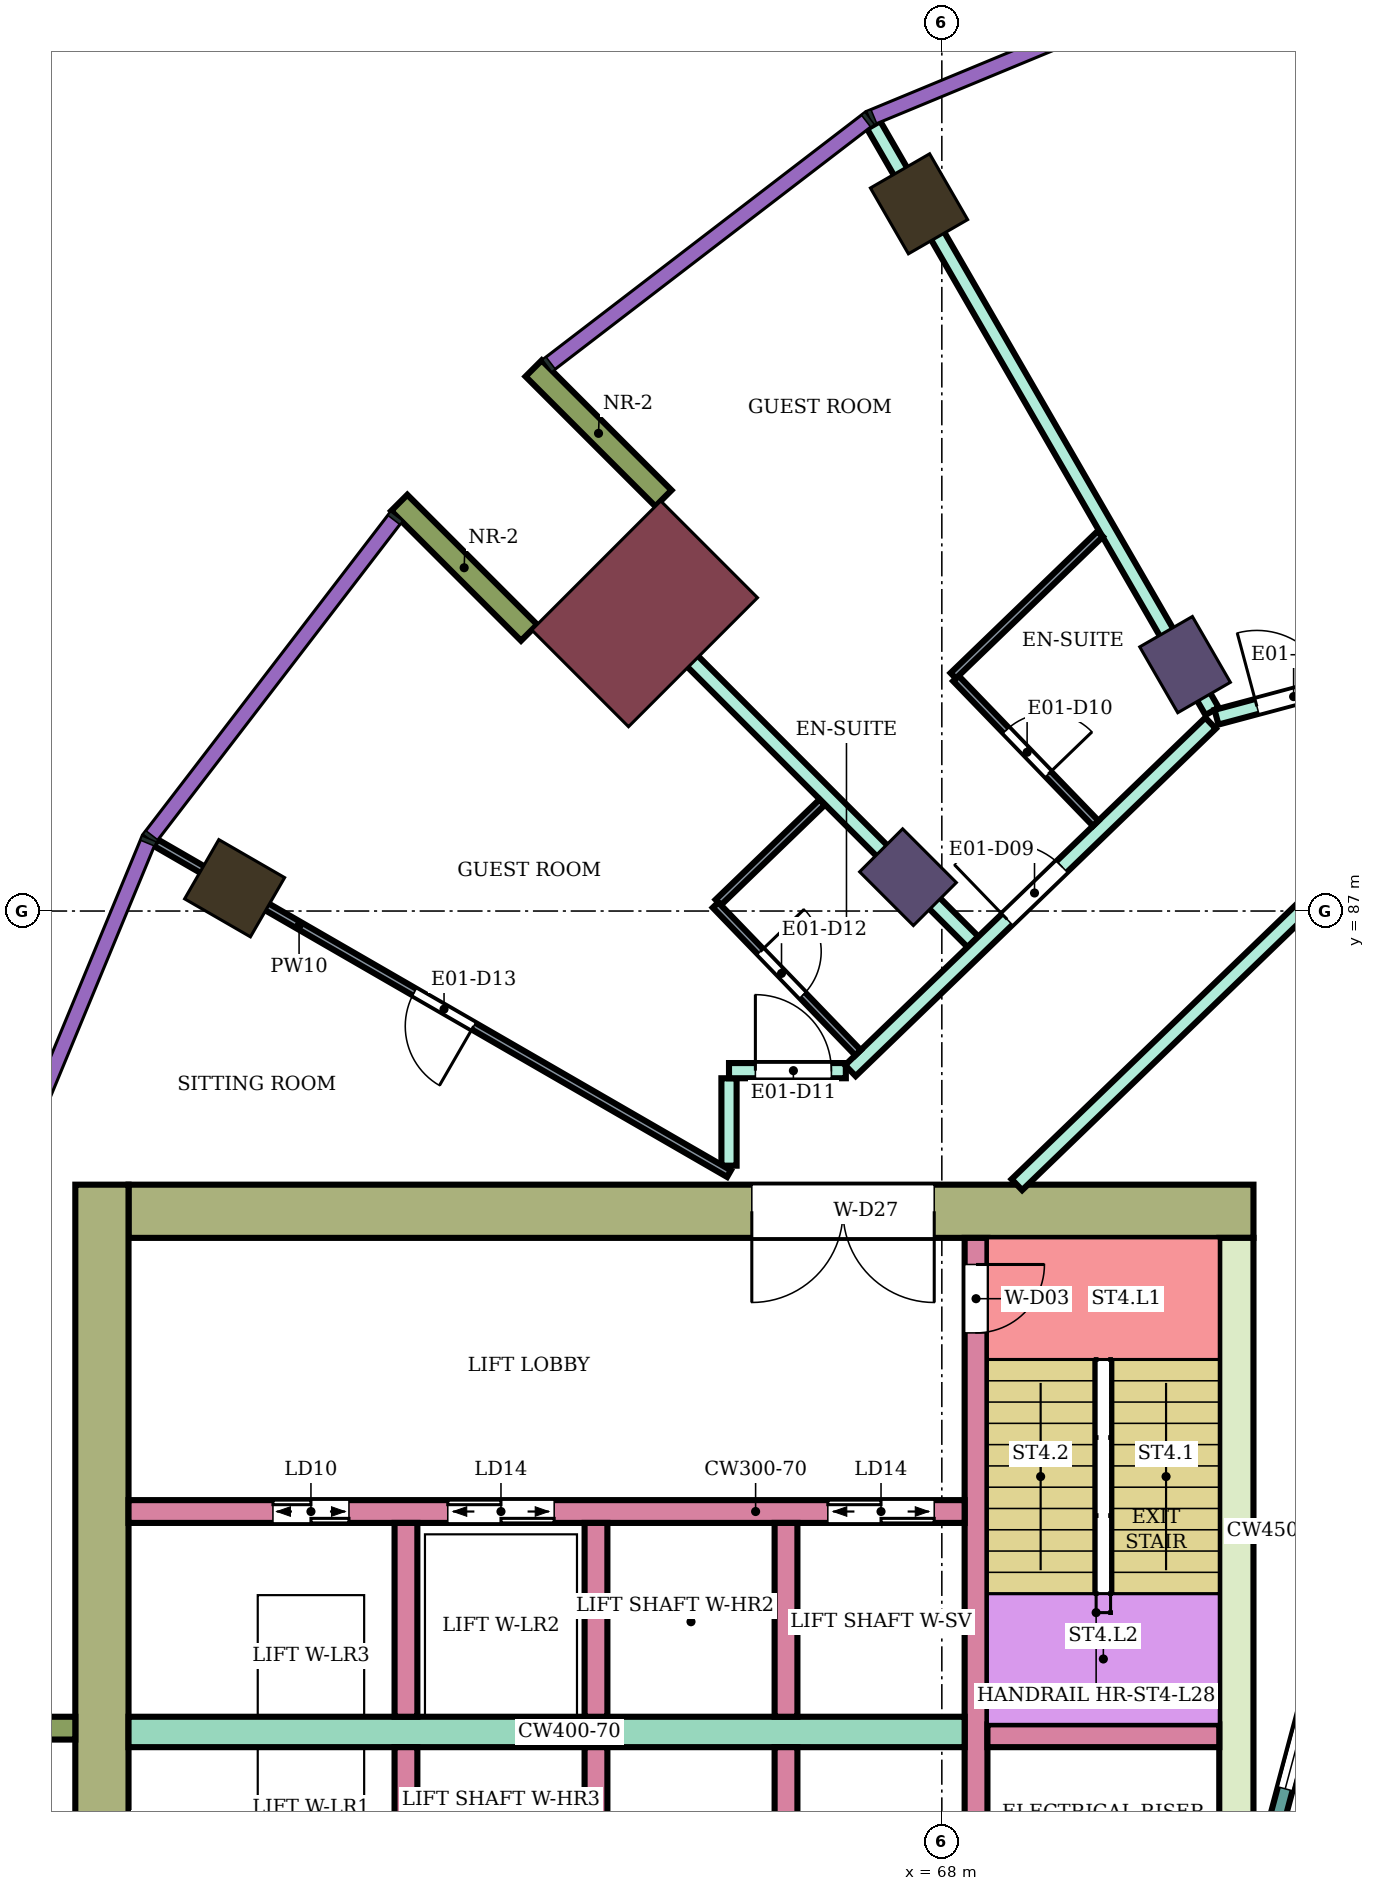
"""IFC4 building model, lengths in metres.
Left out: names, types, materials, properties, quantities, classifications, styles, units other than length and angle.
Written with IfcOpenShell. Run it as: python <this file> out.ifc"""

import sys

from ifc_helpers import new_model, si_unit, direction, frame, frame_2d, origin, origin_2d, place, context, subcontext, project, spatial, rectangle, extrude, element, fill, save


model = new_model("IFC4")
c1 = context("Model", 3, precision=1e-05, world=origin(), true_north=direction((0.0, 1.0)))
c2 = subcontext(c1, "Body", "Model", "MODEL_VIEW")
j1 = project(units=[si_unit("LENGTHUNIT", "METRE"), si_unit("PLANEANGLEUNIT", "RADIAN")], contexts=[c1])
p1 = place(None, origin())
s1 = spatial("IfcSite", under=j1, at=p1, CompositionType="ELEMENT")
p2 = place(p1, origin())
s2 = spatial("IfcBuilding", under=s1, at=p2, CompositionType="ELEMENT")
p3 = place(p2, frame((0.0, 0.0, 122.4)))
s3 = spatial("IfcBuildingStorey", under=s2, at=p3, CompositionType="ELEMENT", Elevation=122.4)
for number, where, z_axis, x_axis in (
    (1, (67.7, 96.304, 0.0), (0.0, 0.0, 1.0), (-0.5, 0.866, 0.0)),
    (2, (58.696, 87.3, 0.0), (0.0, 0.0, 1.0), (-0.866, 0.5, 0.0)),
):
    element("IfcColumn", number, at=place(p3, frame(where, z_axis=z_axis, x_axis=x_axis)), inside=s3, PredefinedType="COLUMN", context=c2, shape_type="SweptSolid", body=[
        extrude(rectangle(XDim=1.0, YDim=0.9, at=origin_2d()), origin(), (0.0, 0.0, 1.0), 3.9),
    ])
for number, where, z_axis, x_axis in (
    (3, (71.2, 90.242, 0.0), (0.0, 0.0, 1.0), (-0.5, 0.866, 0.0)),
    (4, (67.555, 87.445, 0.0), (0.0, 0.0, 1.0), (-0.707, 0.707, 0.0)),
):
    element("IfcColumn", number, at=place(p3, frame(where, z_axis=z_axis, x_axis=x_axis)), inside=s3, PredefinedType="COLUMN", context=c2, shape_type="SweptSolid", body=[
        extrude(rectangle(XDim=1.0, YDim=0.8, at=origin_2d()), origin(), (0.0, 0.0, 1.0), 3.9),
    ])
p4 = place(p3, frame((64.09, 90.91, 0.0), z_axis=(0.0, 0.0, 1.0), x_axis=(-0.707106781187, 0.707106781187, 0.0)))
e5 = element("IfcColumn", 5, at=p4, inside=s3, PredefinedType="COLUMN", context=c2, shape_type="SweptSolid", body=[
    extrude(rectangle(XDim=1.8, YDim=2.4, at=origin_2d()), origin(), (0.0, 0.0, 1.0), 3.9),
])
p5 = place(p3, frame((72.1, 83.05, 0.0), z_axis=(0.0, 0.0, 1.0), x_axis=(-1.0, 0.0, 0.0)))
e6 = element("IfcWall", 6, at=p5, inside=s3, PredefinedType="SHEAR", context=c2, shape_type="SweptSolid", body=[
    extrude(rectangle(XDim=14.8, YDim=0.7, at=frame_2d((7.4, 0.0))), origin(), (0.0, 0.0, 1.0), 3.58),
])
p6 = place(p5, frame((4.2, 0.0, 0.0)))
e7 = element("IfcOpeningElement", 7, at=p6, cuts=e6, PredefinedType="OPENING", context=c2, shape_type="SweptSolid", body=[
    extrude(rectangle(XDim=2.4, YDim=2.4, at=frame_2d((1.2, 1.2))), frame((0.0, 0.36, 0.0), z_axis=(0.0, -1.0, 0.0), x_axis=(1.0, 0.0, 0.0)), (0.0, 0.0, 1.0), 0.72),
])
p7 = place(p3, frame((71.875, 82.7, 0.0), z_axis=(0.0, 0.0, 1.0), x_axis=(0.0, -1.0, 0.0)))
e8 = element("IfcWall", 8, at=p7, inside=s3, PredefinedType="SHEAR", context=c2, shape_type="SweptSolid", body=[
    extrude(rectangle(XDim=7.7, YDim=0.45, at=frame_2d((3.85, 0.0))), origin(), (0.0, 0.0, 1.0), 3.58),
])
p8 = place(p3, frame((56.95, 83.4, 0.0), z_axis=(0.0, 0.0, 1.0), x_axis=(0.0, -1.0, 0.0)))
e9 = element("IfcWall", 9, at=p8, inside=s3, PredefinedType="SHEAR", context=c2, shape_type="SweptSolid", body=[
    extrude(rectangle(XDim=16.8, YDim=0.7, at=frame_2d((8.4, 0.0))), origin(), (0.0, 0.0, 1.0), 3.58),
])
p9 = place(p3, frame((68.45, 82.7, 0.0), z_axis=(0.0, 0.0, 1.0), x_axis=(0.0, -1.0, 0.0)))
e10 = element("IfcWall", 10, at=p9, inside=s3, PredefinedType="SHEAR", context=c2, shape_type="SweptSolid", body=[
    extrude(rectangle(XDim=7.7, YDim=0.3, at=frame_2d((3.85, 0.0))), origin(), (0.0, 0.0, 1.0), 3.58),
])
p10 = place(p9, frame((0.35, 0.0, 0.0)))
e11 = element("IfcOpeningElement", 11, at=p10, cuts=e10, PredefinedType="OPENING", context=c2, shape_type="SweptSolid", body=[
    extrude(rectangle(XDim=0.9, YDim=2.1, at=frame_2d((0.45, 1.05))), frame((0.0, 0.16, 0.0), z_axis=(0.0, -1.0, 0.0), x_axis=(1.0, 0.0, 0.0)), (0.0, 0.0, 1.0), 0.32),
])
p11 = place(p3, frame((71.65, 76.15, 0.0), z_axis=(0.0, 0.0, 1.0), x_axis=(-1.0, 0.0, 0.0)))
e12 = element("IfcWall", 12, at=p11, inside=s3, PredefinedType="SHEAR", context=c2, shape_type="SweptSolid", body=[
    extrude(rectangle(XDim=3.05, YDim=0.3, at=frame_2d((1.525, 0.0))), origin(), (0.0, 0.0, 1.0), 3.58),
])
p12 = place(p3, frame((68.3, 76.2, 0.0), z_axis=(0.0, 0.0, 1.0), x_axis=(-1.0, 0.0, 0.0)))
e13 = element("IfcWall", 13, at=p12, inside=s3, PredefinedType="SHEAR", context=c2, shape_type="SweptSolid", body=[
    extrude(rectangle(XDim=11.0, YDim=0.4, at=frame_2d((5.5, 0.0))), origin(), (0.0, 0.0, 1.0), 3.58),
])
p13 = place(p3, frame((68.3, 79.1, 0.0), z_axis=(0.0, 0.0, 1.0), x_axis=(-1.0, 0.0, 0.0)))
e14 = element("IfcWall", 14, at=p13, inside=s3, PredefinedType="SHEAR", context=c2, shape_type="SweptSolid", body=[
    extrude(rectangle(XDim=11.0, YDim=0.3, at=frame_2d((5.5, 0.0))), origin(), (0.0, 0.0, 1.0), 3.58),
])
p14 = place(p13, frame((0.4, 0.0, 0.0)))
e15 = element("IfcOpeningElement", 15, at=p14, cuts=e14, PredefinedType="OPENING", context=c2, shape_type="SweptSolid", body=[
    extrude(rectangle(XDim=1.4, YDim=2.1, at=frame_2d((0.7, 1.05))), frame((0.0, 0.16, 0.0), z_axis=(0.0, -1.0, 0.0), x_axis=(1.0, 0.0, 0.0)), (0.0, 0.0, 1.0), 0.32),
])
p15 = place(p13, frame((5.4, 0.0, 0.0)))
e16 = element("IfcOpeningElement", 16, at=p15, cuts=e14, PredefinedType="OPENING", context=c2, shape_type="SweptSolid", body=[
    extrude(rectangle(XDim=1.4, YDim=2.1, at=frame_2d((0.7, 1.05))), frame((0.0, 0.16, 0.0), z_axis=(0.0, -1.0, 0.0), x_axis=(1.0, 0.0, 0.0)), (0.0, 0.0, 1.0), 0.32),
])
p16 = place(p13, frame((8.1, 0.0, 0.0)))
e17 = element("IfcOpeningElement", 17, at=p16, cuts=e14, PredefinedType="OPENING", context=c2, shape_type="SweptSolid", body=[
    extrude(rectangle(XDim=1.0, YDim=2.1, at=frame_2d((0.5, 1.05))), frame((0.0, 0.16, 0.0), z_axis=(0.0, -1.0, 0.0), x_axis=(1.0, 0.0, 0.0)), (0.0, 0.0, 1.0), 0.32),
])
for number, where, z_axis, x_axis in (
    (18, (65.95, 76.0, 0.0), (0.0, 0.0, 1.0), (0.0, -1.0, 0.0)),
    (19, (63.45, 76.0, 0.0), (0.0, 0.0, 1.0), (0.0, -1.0, 0.0)),
    (20, (60.95, 76.0, 0.0), (0.0, 0.0, 1.0), (0.0, -1.0, 0.0)),
    (21, (65.95, 78.95, 0.0), (0.0, 0.0, 1.0), (0.0, -1.0, 0.0)),
    (22, (63.45, 78.95, 0.0), (0.0, 0.0, 1.0), (0.0, -1.0, 0.0)),
    (23, (60.95, 78.95, 0.0), (0.0, 0.0, 1.0), (0.0, -1.0, 0.0)),
):
    element("IfcWall", number, at=place(p3, frame(where, z_axis=z_axis, x_axis=x_axis)), inside=s3, PredefinedType="SHEAR", context=c2, shape_type="SweptSolid", body=[
        extrude(rectangle(XDim=2.55, YDim=0.3, at=frame_2d((1.275, 0.0))), origin(), (0.0, 0.0, 1.0), 3.58),
    ])
for number, where, z_axis, x_axis in (
    (24, (64.338, 92.43, 0.0), (0.0, 0.0, 1.0), (-0.707, 0.707, 0.0)),
    (25, (62.57, 90.662, 0.0), (0.0, 0.0, 1.0), (-0.707, 0.707, 0.0)),
    (26, (56.6, 76.25, 0.0), (0.0, 0.0, 1.0), (-1.0, 0.0, 0.0)),
):
    element("IfcWall", number, at=place(p3, frame(where, z_axis=z_axis, x_axis=x_axis)), inside=s3, PredefinedType="NOTDEFINED", context=c2, shape_type="SweptSolid", body=[
        extrude(rectangle(XDim=2.416, YDim=0.3, at=frame_2d((1.208, 0.0))), origin(), (0.0, 0.0, 1.0), 3.9),
    ])
p17 = place(p3, frame((73.415, 78.802, 0.0), z_axis=(0.0, 0.0, 1.0), x_axis=(-0.258789828301, -0.965933654434, 0.0)))
e27 = element("IfcWall", 27, at=p17, inside=s3, PredefinedType="NOTDEFINED", context=c2, shape_type="SweptSolid", body=[
    extrude(rectangle(XDim=3.936, YDim=0.2, at=frame_2d((1.968, 0.0))), origin(), (0.0, 0.0, 1.0), 3.9),
])
p18 = place(p17, frame((0.468, 0.0, 0.9)))
e28 = element("IfcOpeningElement", 28, at=p18, cuts=e27, PredefinedType="OPENING", context=c2, shape_type="SweptSolid", body=[
    extrude(rectangle(XDim=3.0, YDim=2.3, at=frame_2d((1.5, 1.15))), frame((0.0, 0.11, 0.0), z_axis=(0.0, -1.0, 0.0), x_axis=(1.0, 0.0, 0.0)), (0.0, 0.0, 1.0), 0.22),
])
p19 = place(p3, frame((63.598, 91.408, 0.0), z_axis=(0.0, 0.0, 1.0), x_axis=(0.706963264491, -0.707250268759, 0.0)))
e29 = element("IfcWall", 29, at=p19, inside=s3, PredefinedType="PARTITIONING", context=c2, shape_type="SweptSolid", body=[
    extrude(rectangle(XDim=6.805, YDim=0.2, at=frame_2d((3.403, 0.0))), origin(), (0.0, 0.0, 1.0), 3.45),
])
p20 = place(p3, frame((65.2, 83.65, 0.0), z_axis=(0.0, 0.0, 1.0), x_axis=(0.0, 1.0, 0.0)))
e30 = element("IfcWall", 30, at=p20, inside=s3, PredefinedType="PARTITIONING", context=c2, shape_type="SweptSolid", body=[
    extrude(rectangle(XDim=1.15, YDim=0.2, at=frame_2d((0.575, 0.0))), origin(), (0.0, 0.0, 1.0), 3.45),
])
p21 = place(p3, frame((65.2, 84.9, 0.0), z_axis=(0.0, 0.0, 1.0), x_axis=(1.0, 0.0, 0.0)))
e31 = element("IfcWall", 31, at=p21, inside=s3, PredefinedType="PARTITIONING", context=c2, shape_type="SweptSolid", body=[
    extrude(rectangle(XDim=1.537, YDim=0.2, at=frame_2d((0.769, 0.0))), origin(), (0.0, 0.0, 1.0), 3.45),
])
p22 = place(p21, frame((0.347, 0.0, 0.0)))
e32 = element("IfcOpeningElement", 32, at=p22, cuts=e31, PredefinedType="OPENING", context=c2, shape_type="SweptSolid", body=[
    extrude(rectangle(XDim=1.0, YDim=2.1, at=frame_2d((0.5, 1.05))), frame((0.0, 0.11, 0.0), z_axis=(0.0, -1.0, 0.0), x_axis=(1.0, 0.0, 0.0)), (0.0, 0.0, 1.0), 0.22),
])
p23 = place(p3, frame((66.797, 84.9, 0.0), z_axis=(0.0, 0.0, 1.0), x_axis=(0.719692092412, 0.694293376116, 0.0)))
e33 = element("IfcWall", 33, at=p23, inside=s3, PredefinedType="PARTITIONING", context=c2, shape_type="SweptSolid", body=[
    extrude(rectangle(XDim=6.584, YDim=0.2, at=frame_2d((3.292, 0.0))), origin(), (0.0, 0.0, 1.0), 3.45),
])
p24 = place(p23, frame((2.866, 0.0, 0.0)))
e34 = element("IfcOpeningElement", 34, at=p24, cuts=e33, PredefinedType="OPENING", context=c2, shape_type="SweptSolid", body=[
    extrude(rectangle(XDim=1.0, YDim=2.1, at=frame_2d((0.5, 1.05))), frame((0.0, 0.11, 0.0), z_axis=(0.0, -1.0, 0.0), x_axis=(1.0, 0.0, 0.0)), (0.0, 0.0, 1.0), 0.22),
])
p25 = place(p3, frame((67.102, 97.342, 0.0), z_axis=(0.0, 0.0, 1.0), x_axis=(0.499927298089, -0.866067374183, 0.0)))
e35 = element("IfcWall", 35, at=p25, inside=s3, PredefinedType="PARTITIONING", context=c2, shape_type="SweptSolid", body=[
    extrude(rectangle(XDim=8.907, YDim=0.2, at=frame_2d((4.454, 0.0))), origin(), (0.0, 0.0, 1.0), 3.45),
])
p26 = place(p3, frame((68.987, 83.4, 0.0), z_axis=(0.0, 0.0, 1.0), x_axis=(0.719586298962, 0.694403022997, 0.0)))
e36 = element("IfcWall", 36, at=p26, inside=s3, PredefinedType="PARTITIONING", context=c2, shape_type="SweptSolid", body=[
    extrude(rectangle(XDim=5.439, YDim=0.2, at=frame_2d((2.719, 0.0))), origin(), (0.0, 0.0, 1.0), 3.45),
])
p27 = place(p3, frame((71.614, 89.55, 0.0), z_axis=(0.0, 0.0, 1.0), x_axis=(0.965967958589, 0.258661753994, 0.0)))
e37 = element("IfcWall", 37, at=p27, inside=s3, PredefinedType="PARTITIONING", context=c2, shape_type="SweptSolid", body=[
    extrude(rectangle(XDim=8.592, YDim=0.2, at=frame_2d((4.296, 0.0))), origin(), (0.0, 0.0, 1.0), 3.45),
])
p28 = place(p27, frame((0.55, 0.0, 0.0)))
e38 = element("IfcOpeningElement", 38, at=p28, cuts=e37, PredefinedType="OPENING", context=c2, shape_type="SweptSolid", body=[
    extrude(rectangle(XDim=1.0, YDim=2.1, at=frame_2d((0.5, 1.05))), frame((0.0, 0.11, 0.0), z_axis=(0.0, -1.0, 0.0), x_axis=(1.0, 0.0, 0.0)), (0.0, 0.0, 1.0), 0.22),
])
p29 = place(p3, frame((57.659, 87.899, 0.0), z_axis=(0.0, 0.0, 1.0), x_axis=(0.86602264145, -0.500004784474, 0.0)))
e39 = element("IfcWall", 39, at=p29, inside=s3, PredefinedType="PARTITIONING", context=c2, shape_type="SweptSolid", body=[
    extrude(rectangle(XDim=8.708, YDim=0.1, at=frame_2d((4.354, 0.0))), origin(), (0.0, 0.0, 1.0), 3.45),
])
p30 = place(p29, frame((3.929, 0.0, 0.0)))
e40 = element("IfcOpeningElement", 40, at=p30, cuts=e39, PredefinedType="OPENING", context=c2, shape_type="SweptSolid", body=[
    extrude(rectangle(XDim=0.9, YDim=2.1, at=frame_2d((0.45, 1.05))), frame((0.0, 0.06, 0.0), z_axis=(0.0, -1.0, 0.0), x_axis=(1.0, 0.0, 0.0)), (0.0, 0.0, 1.0), 0.12),
])
p31 = place(p3, frame((65.059, 87.114, 0.0), z_axis=(0.0, 0.0, 1.0), x_axis=(0.719715847356, 0.694268751324, 0.0)))
e41 = element("IfcWall", 41, at=p31, inside=s3, PredefinedType="PARTITIONING", context=c2, shape_type="SweptSolid", body=[
    extrude(rectangle(XDim=1.9, YDim=0.1, at=frame_2d((0.95, 0.0))), origin(), (0.0, 0.0, 1.0), 3.45),
])
p32 = place(p3, frame((65.023, 87.079, 0.0), z_axis=(0.0, 0.0, 1.0), x_axis=(0.694287838235, -0.719697434815, 0.0)))
e42 = element("IfcWall", 42, at=p32, inside=s3, PredefinedType="PARTITIONING", context=c2, shape_type="SweptSolid", body=[
    extrude(rectangle(XDim=2.7, YDim=0.1, at=frame_2d((1.35, 0.0))), origin(), (0.0, 0.0, 1.0), 3.45),
])
p33 = place(p32, frame((0.85, 0.0, 0.0)))
e43 = element("IfcOpeningElement", 43, at=p33, cuts=e42, PredefinedType="OPENING", context=c2, shape_type="SweptSolid", body=[
    extrude(rectangle(XDim=0.8, YDim=2.1, at=frame_2d((0.4, 1.05))), frame((0.0, 0.06, 0.0), z_axis=(0.0, -1.0, 0.0), x_axis=(1.0, 0.0, 0.0)), (0.0, 0.0, 1.0), 0.12),
])
p34 = place(p3, frame((68.185, 90.06, 0.0), z_axis=(0.0, 0.0, 1.0), x_axis=(0.69446127412, -0.719530081892, 0.0)))
e44 = element("IfcWall", 44, at=p34, inside=s3, PredefinedType="PARTITIONING", context=c2, shape_type="SweptSolid", body=[
    extrude(rectangle(XDim=2.649, YDim=0.1, at=frame_2d((1.324, 0.0))), origin(), (0.0, 0.0, 1.0), 3.45),
])
p35 = place(p34, frame((0.95, 0.0, 0.0)))
e45 = element("IfcOpeningElement", 45, at=p35, cuts=e44, PredefinedType="OPENING", context=c2, shape_type="SweptSolid", body=[
    extrude(rectangle(XDim=0.8, YDim=2.1, at=frame_2d((0.4, 1.05))), frame((0.0, 0.06, 0.0), z_axis=(0.0, -1.0, 0.0), x_axis=(1.0, 0.0, 0.0)), (0.0, 0.0, 1.0), 0.12),
])
p36 = place(p3, frame((68.15, 90.096, 0.0), z_axis=(0.0, 0.0, 1.0), x_axis=(0.719667544954, 0.694318820672, 0.0)))
e46 = element("IfcWall", 46, at=p36, inside=s3, PredefinedType="PARTITIONING", context=c2, shape_type="SweptSolid", body=[
    extrude(rectangle(XDim=2.687, YDim=0.1, at=frame_2d((1.344, 0.0))), origin(), (0.0, 0.0, 1.0), 3.45),
])
p37 = place(p18, origin())
e47 = element("IfcWindow", 47, at=p37, inside=s3, PartitioningType="SINGLE_PANEL", PredefinedType="WINDOW", context=c2, shape_type="SweptSolid", body=[
    extrude(rectangle(XDim=3.0, YDim=2.3, at=frame_2d((1.5, 1.15))), frame((0.0, 0.03, 0.0), z_axis=(0.0, -1.0, 0.0), x_axis=(1.0, 0.0, 0.0)), (0.0, 0.0, 1.0), 0.06),
])
fill(e28, e47)
p38 = place(p28, origin())
e48 = element("IfcDoor", 48, at=p38, inside=s3, OperationType="SINGLE_SWING_LEFT", PredefinedType="DOOR", context=c2, shape_type="SweptSolid", body=[
    extrude(rectangle(XDim=1.0, YDim=2.1, at=frame_2d((0.5, 1.05))), frame((0.0, 0.025, 0.0), z_axis=(0.0, -1.0, 0.0), x_axis=(1.0, 0.0, 0.0)), (0.0, 0.0, 1.0), 0.05),
])
fill(e38, e48)
p39 = place(p24, origin())
e49 = element("IfcDoor", 49, at=p39, inside=s3, OperationType="SINGLE_SWING_LEFT", PredefinedType="DOOR", context=c2, shape_type="SweptSolid", body=[
    extrude(rectangle(XDim=1.0, YDim=2.1, at=frame_2d((0.5, 1.05))), frame((0.0, 0.025, 0.0), z_axis=(0.0, -1.0, 0.0), x_axis=(1.0, 0.0, 0.0)), (0.0, 0.0, 1.0), 0.05),
])
fill(e34, e49)
p40 = place(p35, origin())
e50 = element("IfcDoor", 50, at=p40, inside=s3, OperationType="SINGLE_SWING_RIGHT", PredefinedType="DOOR", context=c2, shape_type="SweptSolid", body=[
    extrude(rectangle(XDim=0.8, YDim=2.1, at=frame_2d((0.4, 1.05))), frame((0.0, 0.025, 0.0), z_axis=(0.0, -1.0, 0.0), x_axis=(1.0, 0.0, 0.0)), (0.0, 0.0, 1.0), 0.05),
])
fill(e45, e50)
p41 = place(p22, origin())
e51 = element("IfcDoor", 51, at=p41, inside=s3, OperationType="SINGLE_SWING_LEFT", PredefinedType="DOOR", context=c2, shape_type="SweptSolid", body=[
    extrude(rectangle(XDim=1.0, YDim=2.1, at=frame_2d((0.5, 1.05))), frame((0.0, 0.025, 0.0), z_axis=(0.0, -1.0, 0.0), x_axis=(1.0, 0.0, 0.0)), (0.0, 0.0, 1.0), 0.05),
])
fill(e32, e51)
p42 = place(p33, origin())
e52 = element("IfcDoor", 52, at=p42, inside=s3, OperationType="SINGLE_SWING_LEFT", PredefinedType="DOOR", context=c2, shape_type="SweptSolid", body=[
    extrude(rectangle(XDim=0.8, YDim=2.1, at=frame_2d((0.4, 1.05))), frame((0.0, 0.025, 0.0), z_axis=(0.0, -1.0, 0.0), x_axis=(1.0, 0.0, 0.0)), (0.0, 0.0, 1.0), 0.05),
])
fill(e43, e52)
p43 = place(p30, frame((0.9, 0.0, 0.0), z_axis=(0.0, 0.0, 1.0), x_axis=(-1.0, 0.0, 0.0)))
e53 = element("IfcDoor", 53, at=p43, inside=s3, OperationType="SINGLE_SWING_LEFT", PredefinedType="DOOR", context=c2, shape_type="SweptSolid", body=[
    extrude(rectangle(XDim=0.9, YDim=2.1, at=frame_2d((0.45, 1.05))), frame((0.0, 0.025, 0.0), z_axis=(0.0, -1.0, 0.0), x_axis=(1.0, 0.0, 0.0)), (0.0, 0.0, 1.0), 0.05),
])
fill(e40, e53)
p44 = place(p10, origin())
e54 = element("IfcDoor", 54, at=p44, inside=s3, OperationType="SINGLE_SWING_LEFT", PredefinedType="DOOR", context=c2, shape_type="SweptSolid", body=[
    extrude(rectangle(XDim=0.9, YDim=2.1, at=frame_2d((0.45, 1.05))), frame((0.0, 0.025, 0.0), z_axis=(0.0, -1.0, 0.0), x_axis=(1.0, 0.0, 0.0)), (0.0, 0.0, 1.0), 0.05),
])
fill(e11, e54)
p45 = place(p14, origin())
e55 = element("IfcDoor", 55, at=p45, inside=s3, OperationType="DOUBLE_DOOR_SLIDING", PredefinedType="DOOR", context=c2, shape_type="SweptSolid", body=[
    extrude(rectangle(XDim=1.4, YDim=2.1, at=frame_2d((0.7, 1.05))), frame((0.0, 0.025, 0.0), z_axis=(0.0, -1.0, 0.0), x_axis=(1.0, 0.0, 0.0)), (0.0, 0.0, 1.0), 0.05),
])
fill(e15, e55)
p46 = place(p15, origin())
e56 = element("IfcDoor", 56, at=p46, inside=s3, OperationType="DOUBLE_DOOR_SLIDING", PredefinedType="DOOR", context=c2, shape_type="SweptSolid", body=[
    extrude(rectangle(XDim=1.4, YDim=2.1, at=frame_2d((0.7, 1.05))), frame((0.0, 0.025, 0.0), z_axis=(0.0, -1.0, 0.0), x_axis=(1.0, 0.0, 0.0)), (0.0, 0.0, 1.0), 0.05),
])
fill(e16, e56)
p47 = place(p16, origin())
e57 = element("IfcDoor", 57, at=p47, inside=s3, OperationType="DOUBLE_DOOR_SLIDING", PredefinedType="DOOR", context=c2, shape_type="SweptSolid", body=[
    extrude(rectangle(XDim=1.0, YDim=2.1, at=frame_2d((0.5, 1.05))), frame((0.0, 0.025, 0.0), z_axis=(0.0, -1.0, 0.0), x_axis=(1.0, 0.0, 0.0)), (0.0, 0.0, 1.0), 0.05),
])
fill(e17, e57)
p48 = place(p6, origin())
e58 = element("IfcDoor", 58, at=p48, inside=s3, OperationType="DOUBLE_DOOR_SINGLE_SWING", PredefinedType="DOOR", context=c2, shape_type="SweptSolid", body=[
    extrude(rectangle(XDim=2.4, YDim=2.4, at=frame_2d((1.2, 1.2))), frame((0.0, 0.025, 0.0), z_axis=(0.0, -1.0, 0.0), x_axis=(1.0, 0.0, 0.0)), (0.0, 0.0, 1.0), 0.05),
])
fill(e7, e58)
save(model, sys.argv[1])
